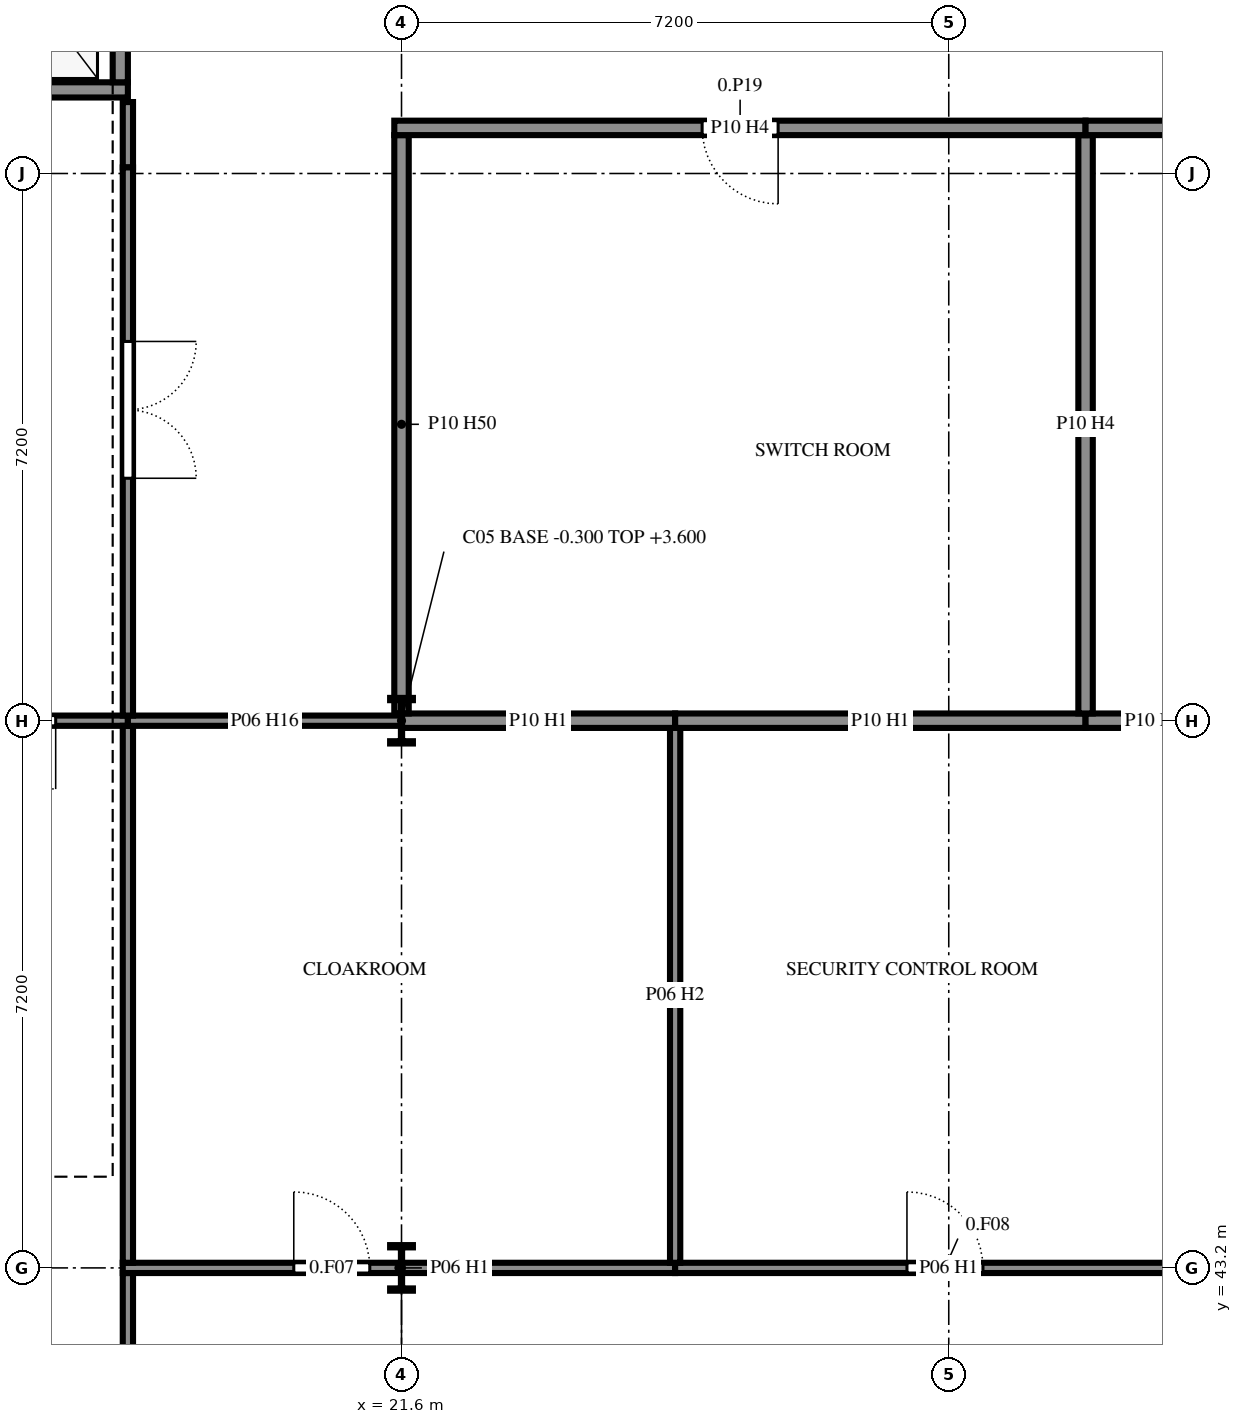
"""IFC4 building model, lengths in metres.
Left out: names, types, materials, properties, quantities, classifications, styles, units other than length and angle.
Written with IfcOpenShell. Run it as: python <this file> out.ifc"""

import sys

from ifc_helpers import new_model, si_unit, direction, frame, frame_2d, origin, origin_2d, place, context, subcontext, project, spatial, rectangle, i_section, extrude, element, fill, save


model = new_model("IFC4")
c1 = context("Model", 3, precision=1e-05, world=origin(), true_north=direction((0.0, 1.0)))
c2 = subcontext(c1, "Body", "Model", "MODEL_VIEW")
j1 = project(units=[si_unit("LENGTHUNIT", "METRE"), si_unit("PLANEANGLEUNIT", "RADIAN")], contexts=[c1])
p1 = place(None, origin())
s1 = spatial("IfcSite", under=j1, at=p1, CompositionType="ELEMENT")
p2 = place(p1, origin())
s2 = spatial("IfcBuilding", under=s1, at=p2, CompositionType="ELEMENT")
p3 = place(p2, origin())
s3 = spatial("IfcBuildingStorey", under=s2, at=p3, CompositionType="ELEMENT", Elevation=0.0)
for number, where, z_axis, x_axis in (
    (1, (21.6, 43.2, -0.3), (0.0, 0.0, 1.0), (1.0, 0.0, 0.0)),
    (2, (21.6, 50.4, -0.3), (0.0, 0.0, 1.0), (1.0, 0.0, 0.0)),
):
    element("IfcColumn", number, at=place(p3, frame(where, z_axis=z_axis, x_axis=x_axis)), inside=s3, PredefinedType="COLUMN", context=c2, shape_type="SweptSolid", body=[
        extrude(i_section(OverallWidth=0.3, OverallDepth=0.6, WebThickness=0.015, FlangeThickness=0.03, FilletRadius=0.027, at=origin_2d()), origin(), (0.0, 0.0, 1.0), 3.9),
    ])
p4 = place(p3, frame((15.6, 58.7, -1.4), z_axis=(0.0, 0.0, 1.0), x_axis=(1.0, 0.0, 0.0)))
e3 = element("IfcWall", 3, at=p4, inside=s3, PredefinedType="SHEAR", context=c2, shape_type="SweptSolid", body=[
    extrude(rectangle(XDim=2.4, YDim=0.2, at=frame_2d((1.2, 0.0))), origin(), (0.0, 0.0, 1.0), 5.0),
])
p5 = place(p3, frame((17.9, 58.8, -1.4), z_axis=(0.0, 0.0, 1.0), x_axis=(0.0, 1.0, 0.0)))
e4 = element("IfcWall", 4, at=p5, inside=s3, PredefinedType="SHEAR", context=c2, shape_type="SweptSolid", body=[
    extrude(rectangle(XDim=2.2, YDim=0.2, at=frame_2d((1.1, 0.0))), origin(), (0.0, 0.0, 1.0), 5.0),
])
p6 = place(p3, frame((18.0, 50.4, 0.0), z_axis=(0.0, 0.0, 1.0), x_axis=(-1.0, 0.0, 0.0)))
e5 = element("IfcWall", 5, at=p6, inside=s3, PredefinedType="PARTITIONING", context=c2, shape_type="SweptSolid", body=[
    extrude(rectangle(XDim=3.667, YDim=0.135, at=frame_2d((1.834, 0.0))), origin(), (0.0, 0.0, 1.0), 3.09),
])
p7 = place(p6, frame((0.95, 0.0, 0.0)))
e6 = element("IfcOpeningElement", 6, at=p7, cuts=e5, PredefinedType="OPENING", context=c2, shape_type="SweptSolid", body=[
    extrude(rectangle(XDim=1.8, YDim=2.4, at=frame_2d((0.9, 1.2))), frame((0.0, 0.077, 0.0), z_axis=(0.0, -1.0, 0.0), x_axis=(1.0, 0.0, 0.0)), (0.0, 0.0, 1.0), 0.155),
])
p8 = place(p3, frame((18.0, 58.54, 0.0), z_axis=(0.0, 0.0, 1.0), x_axis=(0.0, -1.0, 0.0)))
e7 = element("IfcWall", 7, at=p8, inside=s3, PredefinedType="PARTITIONING", context=c2, shape_type="SweptSolid", body=[
    extrude(rectangle(XDim=0.86, YDim=0.135, at=frame_2d((0.43, 0.0))), origin(), (0.0, 0.0, 1.0), 3.21),
])
p9 = place(p3, frame((18.0, 29.03, 0.0), z_axis=(0.0, 0.0, 1.0), x_axis=(0.0, 1.0, 0.0)))
e8 = element("IfcWall", 8, at=p9, inside=s3, PredefinedType="PARTITIONING", context=c2, shape_type="SweptSolid", body=[
    extrude(rectangle(XDim=14.103, YDim=0.135, at=frame_2d((7.051, 0.0))), origin(), (0.0, 0.0, 1.0), 3.12),
])
p10 = place(p3, frame((17.933, 43.2, 0.0), z_axis=(0.0, 0.0, 1.0), x_axis=(1.0, 0.0, 0.0)))
e9 = element("IfcWall", 9, at=p10, inside=s3, PredefinedType="PARTITIONING", context=c2, shape_type="SweptSolid", body=[
    extrude(rectangle(XDim=7.267, YDim=0.135, at=frame_2d((3.634, 0.0))), origin(), (0.0, 0.0, 1.0), 2.82),
])
p11 = place(p10, frame((2.25, 0.0, 0.0)))
e10 = element("IfcOpeningElement", 10, at=p11, cuts=e9, PredefinedType="OPENING", context=c2, shape_type="SweptSolid", body=[
    extrude(rectangle(XDim=1.0, YDim=2.4, at=frame_2d((0.5, 1.2))), frame((0.0, 0.077, 0.0), z_axis=(0.0, -1.0, 0.0), x_axis=(1.0, 0.0, 0.0)), (0.0, 0.0, 1.0), 0.155),
])
p12 = place(p3, frame((25.2, 43.2, 0.0), z_axis=(0.0, 0.0, 1.0), x_axis=(1.0, 0.0, 0.0)))
e11 = element("IfcWall", 11, at=p12, inside=s3, PredefinedType="PARTITIONING", context=c2, shape_type="SweptSolid", body=[
    extrude(rectangle(XDim=7.2, YDim=0.135, at=frame_2d((3.6, 0.0))), origin(), (0.0, 0.0, 1.0), 2.82),
])
p13 = place(p12, frame((3.05, 0.0, 0.0)))
e12 = element("IfcOpeningElement", 12, at=p13, cuts=e11, PredefinedType="OPENING", context=c2, shape_type="SweptSolid", body=[
    extrude(rectangle(XDim=1.0, YDim=2.4, at=frame_2d((0.5, 1.2))), frame((0.0, 0.077, 0.0), z_axis=(0.0, -1.0, 0.0), x_axis=(1.0, 0.0, 0.0)), (0.0, 0.0, 1.0), 0.155),
])
p14 = place(p3, frame((18.0, 50.333, 0.0), z_axis=(0.0, 0.0, 1.0), x_axis=(0.0, -1.0, 0.0)))
e13 = element("IfcWall", 13, at=p14, inside=s3, PredefinedType="PARTITIONING", context=c2, shape_type="SweptSolid", body=[
    extrude(rectangle(XDim=7.065, YDim=0.135, at=frame_2d((3.532, 0.0))), origin(), (0.0, 0.0, 1.0), 3.12),
])
p15 = place(p3, frame((25.2, 50.305, 0.0), z_axis=(0.0, 0.0, 1.0), x_axis=(0.0, -1.0, 0.0)))
e14 = element("IfcWall", 14, at=p15, inside=s3, PredefinedType="PARTITIONING", context=c2, shape_type="SweptSolid", body=[
    extrude(rectangle(XDim=7.037, YDim=0.135, at=frame_2d((3.519, 0.0))), origin(), (0.0, 0.0, 1.0), 3.12),
])
p16 = place(p3, frame((21.6, 50.4, 0.0), z_axis=(0.0, 0.0, 1.0), x_axis=(1.0, 0.0, 0.0)))
e15 = element("IfcWall", 15, at=p16, inside=s3, PredefinedType="PARTITIONING", context=c2, shape_type="SweptSolid", body=[
    extrude(rectangle(XDim=3.6, YDim=0.19, at=frame_2d((1.8, 0.0))), origin(), (0.0, 0.0, 1.0), 2.82),
])
p17 = place(p3, frame((18.0, 50.4, 0.0), z_axis=(0.0, 0.0, 1.0), x_axis=(1.0, 0.0, 0.0)))
e16 = element("IfcWall", 16, at=p17, inside=s3, PredefinedType="PARTITIONING", context=c2, shape_type="SweptSolid", body=[
    extrude(rectangle(XDim=3.6, YDim=0.135, at=frame_2d((1.8, 0.0))), origin(), (0.0, 0.0, 1.0), 3.09),
])
p18 = place(p3, frame((25.2, 50.4, 0.0), z_axis=(0.0, 0.0, 1.0), x_axis=(1.0, 0.0, 0.0)))
e17 = element("IfcWall", 17, at=p18, inside=s3, PredefinedType="PARTITIONING", context=c2, shape_type="SweptSolid", body=[
    extrude(rectangle(XDim=5.4, YDim=0.19, at=frame_2d((2.7, 0.0))), origin(), (0.0, 0.0, 1.0), 2.82),
])
p19 = place(p3, frame((30.6, 50.4, 0.0), z_axis=(0.0, 0.0, 1.0), x_axis=(1.0, 0.0, 0.0)))
e18 = element("IfcWall", 18, at=p19, inside=s3, PredefinedType="PARTITIONING", context=c2, shape_type="SweptSolid", body=[
    extrude(rectangle(XDim=1.8, YDim=0.19, at=frame_2d((0.9, 0.0))), origin(), (0.0, 0.0, 1.0), 2.82),
])
p20 = place(p3, frame((30.6, 58.105, 0.0), z_axis=(0.0, 0.0, 1.0), x_axis=(0.0, -1.0, 0.0)))
e19 = element("IfcWall", 19, at=p20, inside=s3, PredefinedType="PARTITIONING", context=c2, shape_type="SweptSolid", body=[
    extrude(rectangle(XDim=7.61, YDim=0.19, at=frame_2d((3.805, 0.0))), origin(), (0.0, 0.0, 1.0), 3.42),
])
p21 = place(p3, frame((21.6, 50.495, 0.0), z_axis=(0.0, 0.0, 1.0), x_axis=(0.0, 1.0, 0.0)))
e20 = element("IfcWall", 20, at=p21, inside=s3, PredefinedType="PARTITIONING", context=c2, shape_type="SweptSolid", body=[
    extrude(rectangle(XDim=7.61, YDim=0.19, at=frame_2d((3.805, 0.0))), origin(), (0.0, 0.0, 1.0), 2.41),
])
p22 = place(p3, frame((21.505, 58.2, 0.0), z_axis=(0.0, 0.0, 1.0), x_axis=(1.0, 0.0, 0.0)))
e21 = element("IfcWall", 21, at=p22, inside=s3, PredefinedType="PARTITIONING", context=c2, shape_type="SweptSolid", body=[
    extrude(rectangle(XDim=9.095, YDim=0.19, at=frame_2d((4.548, 0.0))), origin(), (0.0, 0.0, 1.0), 3.42),
])
p23 = place(p22, frame((4.05, 0.0, 0.0)))
e22 = element("IfcOpeningElement", 22, at=p23, cuts=e21, PredefinedType="OPENING", context=c2, shape_type="SweptSolid", body=[
    extrude(rectangle(XDim=1.0, YDim=2.4, at=frame_2d((0.5, 1.2))), frame((0.0, 0.105, 0.0), z_axis=(0.0, -1.0, 0.0), x_axis=(1.0, 0.0, 0.0)), (0.0, 0.0, 1.0), 0.21),
])
p24 = place(p3, frame((30.6, 58.2, 0.0), z_axis=(0.0, 0.0, 1.0), x_axis=(1.0, 0.0, 0.0)))
e23 = element("IfcWall", 23, at=p24, inside=s3, PredefinedType="PARTITIONING", context=c2, shape_type="SweptSolid", body=[
    extrude(rectangle(XDim=12.6, YDim=0.19, at=frame_2d((6.3, 0.0))), origin(), (0.0, 0.0, 1.0), 3.42),
])
p25 = place(p24, frame((5.75, 0.0, 0.0)))
e24 = element("IfcOpeningElement", 24, at=p25, cuts=e23, PredefinedType="OPENING", context=c2, shape_type="SweptSolid", body=[
    extrude(rectangle(XDim=1.0, YDim=2.4, at=frame_2d((0.5, 1.2))), frame((0.0, 0.105, 0.0), z_axis=(0.0, -1.0, 0.0), x_axis=(1.0, 0.0, 0.0)), (0.0, 0.0, 1.0), 0.21),
])
p26 = place(p3, frame((18.0, 57.68, 0.0), z_axis=(0.0, 0.0, 1.0), x_axis=(0.0, -1.0, 0.0)))
e25 = element("IfcWall", 25, at=p26, inside=s3, PredefinedType="PARTITIONING", context=c2, shape_type="SweptSolid", body=[
    extrude(rectangle(XDim=7.212, YDim=0.135, at=frame_2d((3.606, 0.0))), origin(), (0.0, 0.0, 1.0), 3.11),
])
p27 = place(p26, frame((2.29, 0.0, 0.0)))
e26 = element("IfcOpeningElement", 26, at=p27, cuts=e25, PredefinedType="OPENING", context=c2, shape_type="SweptSolid", body=[
    extrude(rectangle(XDim=1.8, YDim=2.4, at=frame_2d((0.9, 1.2))), frame((0.0, 0.077, 0.0), z_axis=(0.0, -1.0, 0.0), x_axis=(1.0, 0.0, 0.0)), (0.0, 0.0, 1.0), 0.155),
])
p28 = place(p11, origin())
e27 = element("IfcDoor", 27, at=p28, inside=s3, OperationType="SINGLE_SWING_RIGHT", PredefinedType="DOOR", context=c2, shape_type="SweptSolid", body=[
    extrude(rectangle(XDim=1.0, YDim=2.4, at=frame_2d((0.5, 1.2))), frame((0.0, 0.025, 0.0), z_axis=(0.0, -1.0, 0.0), x_axis=(1.0, 0.0, 0.0)), (0.0, 0.0, 1.0), 0.05),
])
fill(e10, e27)
p29 = place(p13, origin())
e28 = element("IfcDoor", 28, at=p29, inside=s3, OperationType="SINGLE_SWING_RIGHT", PredefinedType="DOOR", context=c2, shape_type="SweptSolid", body=[
    extrude(rectangle(XDim=1.0, YDim=2.4, at=frame_2d((0.5, 1.2))), frame((0.0, 0.025, 0.0), z_axis=(0.0, -1.0, 0.0), x_axis=(1.0, 0.0, 0.0)), (0.0, 0.0, 1.0), 0.05),
])
fill(e12, e28)
p30 = place(p23, frame((1.0, 0.0, 0.0), z_axis=(0.0, 0.0, 1.0), x_axis=(-1.0, 0.0, 0.0)))
e29 = element("IfcDoor", 29, at=p30, inside=s3, OperationType="SINGLE_SWING_RIGHT", PredefinedType="DOOR", context=c2, shape_type="SweptSolid", body=[
    extrude(rectangle(XDim=1.0, YDim=2.4, at=frame_2d((0.5, 1.2))), frame((0.0, 0.025, 0.0), z_axis=(0.0, -1.0, 0.0), x_axis=(1.0, 0.0, 0.0)), (0.0, 0.0, 1.0), 0.05),
])
fill(e22, e29)
p31 = place(p7, origin())
e30 = element("IfcDoor", 30, at=p31, inside=s3, OperationType="DOUBLE_DOOR_SINGLE_SWING", PredefinedType="DOOR", context=c2, shape_type="SweptSolid", body=[
    extrude(rectangle(XDim=1.8, YDim=2.4, at=frame_2d((0.9, 1.2))), frame((0.0, 0.025, 0.0), z_axis=(0.0, -1.0, 0.0), x_axis=(1.0, 0.0, 0.0)), (0.0, 0.0, 1.0), 0.05),
])
fill(e6, e30)
p32 = place(p27, origin())
e31 = element("IfcDoor", 31, at=p32, inside=s3, OperationType="DOUBLE_DOOR_SINGLE_SWING", PredefinedType="DOOR", context=c2, shape_type="SweptSolid", body=[
    extrude(rectangle(XDim=1.8, YDim=2.4, at=frame_2d((0.9, 1.2))), frame((0.0, 0.025, 0.0), z_axis=(0.0, -1.0, 0.0), x_axis=(1.0, 0.0, 0.0)), (0.0, 0.0, 1.0), 0.05),
])
fill(e26, e31)
save(model, sys.argv[1])
